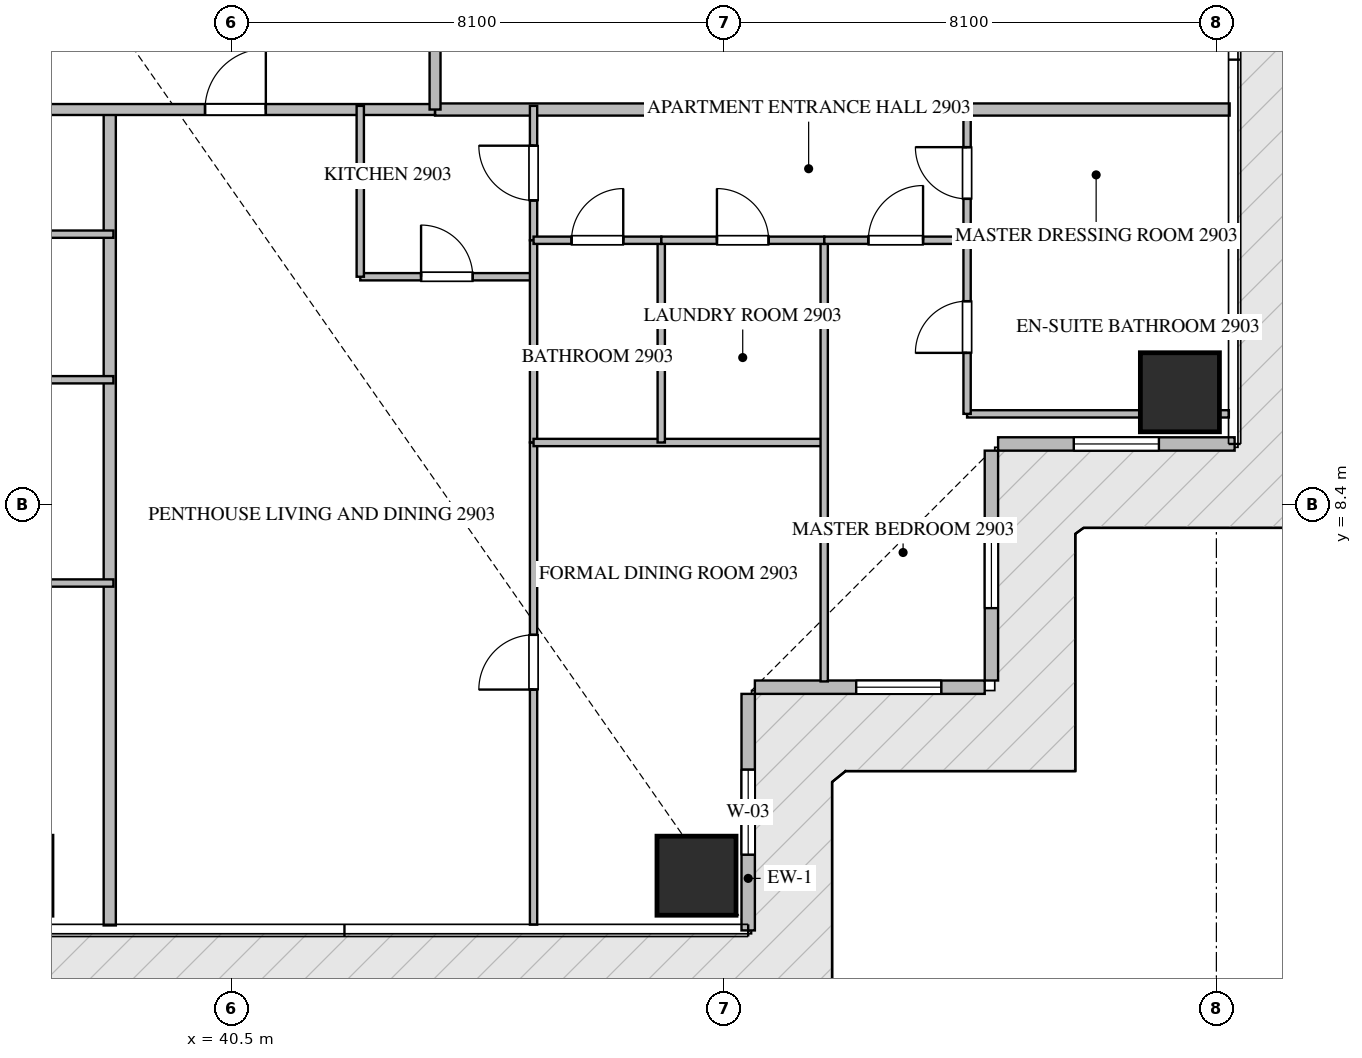
"""IFC4 building model, lengths in metres.
Left out: names, types, materials, properties, quantities, classifications, styles, units other than length and angle.
Written with IfcOpenShell. Run it as: python <this file> out.ifc"""

import sys

from ifc_helpers import new_model, si_unit, direction, frame, frame_2d, origin, origin_2d, place, context, subcontext, project, spatial, rectangle, extrude, source, transform, mapped, element, fill, save


model = new_model("IFC4")
c1 = context("Model", 3, precision=1e-05, world=origin(), true_north=direction((0.0, 1.0)))
c2 = subcontext(c1, "Body", "Model", "MODEL_VIEW")
j1 = project(units=[si_unit("LENGTHUNIT", "METRE"), si_unit("PLANEANGLEUNIT", "RADIAN")], contexts=[c1])
p1 = place(None, origin())
s1 = spatial("IfcSite", under=j1, at=p1, CompositionType="ELEMENT")
p2 = place(p1, origin())
s2 = spatial("IfcBuilding", under=s1, at=p2, CompositionType="ELEMENT")
p3 = place(p2, frame((0.0, 0.0, 120.15)))
s3 = spatial("IfcBuildingStorey", under=s2, at=p3, CompositionType="ELEMENT", Elevation=120.15)
m1 = source(origin(), c2, "Body", "SweptSolid", [
    extrude(rectangle(XDim=1.3, YDim=1.3, at=origin_2d()), origin(), (0.0, 0.0, 1.0), 3.93),
])
for number, where, z_axis, x_axis in (
    (1, (48.15, 2.3, -0.44), (0.0, 0.0, 1.0), (1.0, 0.0, 0.0)),
    (2, (56.1, 10.25, -0.44), (0.0, 0.0, 1.0), (1.0, 0.0, 0.0)),
):
    element("IfcColumn", number, at=place(p3, frame(where, z_axis=z_axis, x_axis=x_axis)), inside=s3, PredefinedType="COLUMN", context=c2, shape_type="MappedRepresentation", body=[
        mapped(m1, transform((0.0, 0.0, 0.0), scale=1.0)),
    ])
p4 = place(p3, frame((49.0, 1.4, 0.0), z_axis=(0.0, 0.0, 1.0), x_axis=(0.0, 1.0, 0.0)))
e3 = element("IfcWall", 3, at=p4, inside=s3, PredefinedType="ELEMENTEDWALL", context=c2, shape_type="SweptSolid", body=[
    extrude(rectangle(XDim=3.89, YDim=0.22, at=frame_2d((1.945, 0.0))), origin(), (0.0, 0.0, 1.0), 3.475),
])
p5 = place(p4, frame((1.245, 0.0, 0.65)))
e4 = element("IfcOpeningElement", 4, at=p5, cuts=e3, PredefinedType="OPENING", context=c2, shape_type="SweptSolid", body=[
    extrude(rectangle(XDim=1.4, YDim=2.05, at=frame_2d((0.7, 1.025))), frame((0.0, 0.12, 0.0), z_axis=(0.0, -1.0, 0.0), x_axis=(1.0, 0.0, 0.0)), (0.0, 0.0, 1.0), 0.24),
])
p6 = place(p3, frame((49.11, 5.4, 0.0), z_axis=(0.0, 0.0, 1.0), x_axis=(1.0, 0.0, 0.0)))
e5 = element("IfcWall", 5, at=p6, inside=s3, PredefinedType="ELEMENTEDWALL", context=c2, shape_type="SweptSolid", body=[
    extrude(rectangle(XDim=3.78, YDim=0.22, at=frame_2d((1.89, 0.0))), origin(), (0.0, 0.0, 1.0), 3.475),
])
p7 = place(p6, frame((1.666, 0.0, 0.65)))
e6 = element("IfcOpeningElement", 6, at=p7, cuts=e5, PredefinedType="OPENING", context=c2, shape_type="SweptSolid", body=[
    extrude(rectangle(XDim=1.4, YDim=2.05, at=frame_2d((0.7, 1.025))), frame((0.0, 0.12, 0.0), z_axis=(0.0, -1.0, 0.0), x_axis=(1.0, 0.0, 0.0)), (0.0, 0.0, 1.0), 0.24),
])
p8 = place(p3, frame((53.0, 5.51, 0.0), z_axis=(0.0, 0.0, 1.0), x_axis=(0.0, 1.0, 0.0)))
e7 = element("IfcWall", 7, at=p8, inside=s3, PredefinedType="ELEMENTEDWALL", context=c2, shape_type="SweptSolid", body=[
    extrude(rectangle(XDim=3.78, YDim=0.22, at=frame_2d((1.89, 0.0))), origin(), (0.0, 0.0, 1.0), 3.475),
])
p9 = place(p8, frame((1.19, 0.0, 0.65)))
e8 = element("IfcOpeningElement", 8, at=p9, cuts=e7, PredefinedType="OPENING", context=c2, shape_type="SweptSolid", body=[
    extrude(rectangle(XDim=1.4, YDim=2.05, at=frame_2d((0.7, 1.025))), frame((0.0, 0.12, 0.0), z_axis=(0.0, -1.0, 0.0), x_axis=(1.0, 0.0, 0.0)), (0.0, 0.0, 1.0), 0.24),
])
p10 = place(p3, frame((53.11, 9.4, 0.0), z_axis=(0.0, 0.0, 1.0), x_axis=(1.0, 0.0, 0.0)))
e9 = element("IfcWall", 9, at=p10, inside=s3, PredefinedType="ELEMENTEDWALL", context=c2, shape_type="SweptSolid", body=[
    extrude(rectangle(XDim=3.89, YDim=0.22, at=frame_2d((1.945, 0.0))), origin(), (0.0, 0.0, 1.0), 3.475),
])
p11 = place(p10, frame((1.245, 0.0, 0.65)))
e10 = element("IfcOpeningElement", 10, at=p11, cuts=e9, PredefinedType="OPENING", context=c2, shape_type="SweptSolid", body=[
    extrude(rectangle(XDim=1.4, YDim=2.05, at=frame_2d((0.7, 1.025))), frame((0.0, 0.12, 0.0), z_axis=(0.0, -1.0, 0.0), x_axis=(1.0, 0.0, 0.0)), (0.0, 0.0, 1.0), 0.24),
])
p12 = place(p3, frame((38.5, 1.482, 0.0), z_axis=(0.0, 0.0, 1.0), x_axis=(0.0, 1.0, 0.0)))
e11 = element("IfcWall", 11, at=p12, inside=s3, PredefinedType="PARTITIONING", context=c2, shape_type="SweptSolid", body=[
    extrude(rectangle(XDim=13.418, YDim=0.2, at=frame_2d((6.709, 0.0))), origin(), (0.0, 0.0, 1.0), 3.49),
])
p13 = place(p3, frame((43.85, 14.9, 0.0), z_axis=(0.0, 0.0, 1.0), x_axis=(1.0, 0.0, 0.0)))
e12 = element("IfcWall", 12, at=p13, inside=s3, PredefinedType="PARTITIONING", context=c2, shape_type="SweptSolid", body=[
    extrude(rectangle(XDim=13.068, YDim=0.2, at=frame_2d((6.534, 0.0))), origin(), (0.0, 0.0, 1.0), 3.49),
])
p14 = place(p3, frame((20.952, 14.9, 0.0), z_axis=(0.0, 0.0, 1.0), x_axis=(1.0, 0.0, 0.0)))
e13 = element("IfcWall", 13, at=p14, inside=s3, PredefinedType="PARTITIONING", context=c2, shape_type="SweptSolid", body=[
    extrude(rectangle(XDim=22.896, YDim=0.18, at=frame_2d((11.448, 0.0))), origin(), (0.0, 0.0, 1.0), 3.49),
])
p15 = place(p14, frame((2.781, 0.0, 0.0)))
e14 = element("IfcOpeningElement", 14, at=p15, cuts=e13, PredefinedType="OPENING", context=c2, shape_type="SweptSolid", body=[
    extrude(rectangle(XDim=1.0, YDim=2.15, at=frame_2d((0.5, 1.075))), frame((0.0, 0.1, 0.0), z_axis=(0.0, -1.0, 0.0), x_axis=(1.0, 0.0, 0.0)), (0.0, 0.0, 1.0), 0.2),
])
p16 = place(p14, frame((7.16, 0.0, 0.0)))
e15 = element("IfcOpeningElement", 15, at=p16, cuts=e13, PredefinedType="OPENING", context=c2, shape_type="SweptSolid", body=[
    extrude(rectangle(XDim=1.0, YDim=2.15, at=frame_2d((0.5, 1.075))), frame((0.0, 0.1, 0.0), z_axis=(0.0, -1.0, 0.0), x_axis=(1.0, 0.0, 0.0)), (0.0, 0.0, 1.0), 0.2),
])
p17 = place(p14, frame((19.115, 0.0, 0.0)))
e16 = element("IfcOpeningElement", 16, at=p17, cuts=e13, PredefinedType="OPENING", context=c2, shape_type="SweptSolid", body=[
    extrude(rectangle(XDim=1.0, YDim=2.15, at=frame_2d((0.5, 1.075))), frame((0.0, 0.1, 0.0), z_axis=(0.0, -1.0, 0.0), x_axis=(1.0, 0.0, 0.0)), (0.0, 0.0, 1.0), 0.2),
])
p18 = place(p3, frame((43.85, 14.9, 0.0), z_axis=(0.0, 0.0, 1.0), x_axis=(0.0, 1.0, 0.0)))
e17 = element("IfcWall", 17, at=p18, inside=s3, PredefinedType="PARTITIONING", context=c2, shape_type="SweptSolid", body=[
    extrude(rectangle(XDim=18.7, YDim=0.18, at=frame_2d((9.35, 0.0))), origin(), (0.0, 0.0, 1.0), 3.49),
])
p19 = place(p18, frame((1.805, 0.0, 0.0)))
e18 = element("IfcOpeningElement", 18, at=p19, cuts=e17, PredefinedType="OPENING", context=c2, shape_type="SweptSolid", body=[
    extrude(rectangle(XDim=1.0, YDim=2.15, at=frame_2d((0.5, 1.075))), frame((0.0, 0.1, 0.0), z_axis=(0.0, -1.0, 0.0), x_axis=(1.0, 0.0, 0.0)), (0.0, 0.0, 1.0), 0.2),
])
p20 = place(p18, frame((10.602, 0.0, 0.0)))
e19 = element("IfcOpeningElement", 19, at=p20, cuts=e17, PredefinedType="OPENING", context=c2, shape_type="SweptSolid", body=[
    extrude(rectangle(XDim=1.0, YDim=2.15, at=frame_2d((0.5, 1.075))), frame((0.0, 0.1, 0.0), z_axis=(0.0, -1.0, 0.0), x_axis=(1.0, 0.0, 0.0)), (0.0, 0.0, 1.0), 0.2),
])
p21 = place(p3, frame((30.94, 7.113, 0.0), z_axis=(0.0, 0.0, 1.0), x_axis=(1.0, 0.0, 0.0)))
e20 = element("IfcWall", 20, at=p21, inside=s3, PredefinedType="PARTITIONING", context=c2, shape_type="SweptSolid", body=[
    extrude(rectangle(XDim=7.62, YDim=0.12, at=frame_2d((3.81, 0.0))), origin(), (0.0, 0.0, 1.0), 3.49),
])
p22 = place(p3, frame((30.94, 10.456, 0.0), z_axis=(0.0, 0.0, 1.0), x_axis=(1.0, 0.0, 0.0)))
e21 = element("IfcWall", 21, at=p22, inside=s3, PredefinedType="PARTITIONING", context=c2, shape_type="SweptSolid", body=[
    extrude(rectangle(XDim=7.62, YDim=0.12, at=frame_2d((3.81, 0.0))), origin(), (0.0, 0.0, 1.0), 2.972),
])
p23 = place(p3, frame((30.94, 12.85, 0.0), z_axis=(0.0, 0.0, 1.0), x_axis=(1.0, 0.0, 0.0)))
e22 = element("IfcWall", 22, at=p23, inside=s3, PredefinedType="PARTITIONING", context=c2, shape_type="SweptSolid", body=[
    extrude(rectangle(XDim=7.62, YDim=0.12, at=frame_2d((3.81, 0.0))), origin(), (0.0, 0.0, 1.0), 3.49),
])
p24 = place(p3, frame((42.62, 12.15, 0.0), z_axis=(0.0, 0.0, 1.0), x_axis=(1.0, 0.0, 0.0)))
e23 = element("IfcWall", 23, at=p24, inside=s3, PredefinedType="PARTITIONING", context=c2, shape_type="SweptSolid", body=[
    extrude(rectangle(XDim=2.85, YDim=0.12, at=frame_2d((1.425, 0.0))), origin(), (0.0, 0.0, 1.0), 3.49),
])
p25 = place(p24, frame((1.0, 0.0, 0.0)))
e24 = element("IfcOpeningElement", 24, at=p25, cuts=e23, PredefinedType="OPENING", context=c2, shape_type="SweptSolid", body=[
    extrude(rectangle(XDim=0.85, YDim=2.1, at=frame_2d((0.425, 1.05))), frame((0.0, 0.07, 0.0), z_axis=(0.0, -1.0, 0.0), x_axis=(1.0, 0.0, 0.0)), (0.0, 0.0, 1.0), 0.14),
])
p26 = place(p3, frame((42.62, 12.15, 0.0), z_axis=(0.0, 0.0, 1.0), x_axis=(0.0, 1.0, 0.0)))
e25 = element("IfcWall", 25, at=p26, inside=s3, PredefinedType="PARTITIONING", context=c2, shape_type="SweptSolid", body=[
    extrude(rectangle(XDim=2.81, YDim=0.12, at=frame_2d((1.405, 0.0))), origin(), (0.0, 0.0, 1.0), 3.49),
])
p27 = place(p3, frame((45.47, 12.75, 0.0), z_axis=(0.0, 0.0, 1.0), x_axis=(0.0, 1.0, 0.0)))
e26 = element("IfcWall", 26, at=p27, inside=s3, PredefinedType="PARTITIONING", context=c2, shape_type="SweptSolid", body=[
    extrude(rectangle(XDim=2.21, YDim=0.12, at=frame_2d((1.105, 0.0))), origin(), (0.0, 0.0, 1.0), 3.49),
])
p28 = place(p27, frame((0.655, 0.0, 0.0)))
e27 = element("IfcOpeningElement", 27, at=p28, cuts=e26, PredefinedType="OPENING", context=c2, shape_type="SweptSolid", body=[
    extrude(rectangle(XDim=0.9, YDim=2.1, at=frame_2d((0.45, 1.05))), frame((0.0, 0.07, 0.0), z_axis=(0.0, -1.0, 0.0), x_axis=(1.0, 0.0, 0.0)), (0.0, 0.0, 1.0), 0.14),
])
p29 = place(p3, frame((45.47, 1.495, 0.0), z_axis=(0.0, 0.0, 1.0), x_axis=(0.0, 1.0, 0.0)))
e28 = element("IfcWall", 28, at=p29, inside=s3, PredefinedType="PARTITIONING", context=c2, shape_type="SweptSolid", body=[
    extrude(rectangle(XDim=7.929, YDim=0.12, at=frame_2d((3.964, 0.0))), origin(), (0.0, 0.0, 1.0), 3.49),
])
p30 = place(p29, frame((3.866, 0.0, 0.0)))
e29 = element("IfcOpeningElement", 29, at=p30, cuts=e28, PredefinedType="OPENING", context=c2, shape_type="SweptSolid", body=[
    extrude(rectangle(XDim=0.9, YDim=2.1, at=frame_2d((0.45, 1.05))), frame((0.0, 0.07, 0.0), z_axis=(0.0, -1.0, 0.0), x_axis=(1.0, 0.0, 0.0)), (0.0, 0.0, 1.0), 0.14),
])
p31 = place(p3, frame((45.47, 9.426, 0.0), z_axis=(0.0, 0.0, 1.0), x_axis=(0.0, 1.0, 0.0)))
e30 = element("IfcWall", 30, at=p31, inside=s3, PredefinedType="PARTITIONING", context=c2, shape_type="SweptSolid", body=[
    extrude(rectangle(XDim=3.322, YDim=0.12, at=frame_2d((1.661, 0.0))), origin(), (0.0, 0.0, 1.0), 3.49),
])
p32 = place(p3, frame((45.47, 9.424, 0.0), z_axis=(0.0, 0.0, 1.0), x_axis=(1.0, 0.0, 0.0)))
e31 = element("IfcWall", 31, at=p32, inside=s3, PredefinedType="PARTITIONING", context=c2, shape_type="SweptSolid", body=[
    extrude(rectangle(XDim=4.78, YDim=0.12, at=frame_2d((2.39, 0.0))), origin(), (0.0, 0.0, 1.0), 3.49),
])
p33 = place(p3, frame((50.25, 5.495, 0.0), z_axis=(0.0, 0.0, 1.0), x_axis=(0.0, 1.0, 0.0)))
e32 = element("IfcWall", 32, at=p33, inside=s3, PredefinedType="PARTITIONING", context=c2, shape_type="SweptSolid", body=[
    extrude(rectangle(XDim=7.255, YDim=0.12, at=frame_2d((3.627, 0.0))), origin(), (0.0, 0.0, 1.0), 3.49),
])
p34 = place(p3, frame((47.57, 9.424, 0.0), z_axis=(0.0, 0.0, 1.0), x_axis=(0.0, 1.0, 0.0)))
e33 = element("IfcWall", 33, at=p34, inside=s3, PredefinedType="PARTITIONING", context=c2, shape_type="SweptSolid", body=[
    extrude(rectangle(XDim=3.326, YDim=0.12, at=frame_2d((1.663, 0.0))), origin(), (0.0, 0.0, 1.0), 3.49),
])
p35 = place(p3, frame((45.47, 12.75, 0.0), z_axis=(0.0, 0.0, 1.0), x_axis=(1.0, 0.0, 0.0)))
e34 = element("IfcWall", 34, at=p35, inside=s3, PredefinedType="PARTITIONING", context=c2, shape_type="SweptSolid", body=[
    extrude(rectangle(XDim=2.1, YDim=0.12, at=frame_2d((1.05, 0.0))), origin(), (0.0, 0.0, 1.0), 3.49),
])
p36 = place(p35, frame((0.625, 0.0, 0.0)))
e35 = element("IfcOpeningElement", 35, at=p36, cuts=e34, PredefinedType="OPENING", context=c2, shape_type="SweptSolid", body=[
    extrude(rectangle(XDim=0.85, YDim=2.1, at=frame_2d((0.425, 1.05))), frame((0.0, 0.07, 0.0), z_axis=(0.0, -1.0, 0.0), x_axis=(1.0, 0.0, 0.0)), (0.0, 0.0, 1.0), 0.14),
])
p37 = place(p3, frame((47.572, 12.75, 0.0), z_axis=(0.0, 0.0, 1.0), x_axis=(1.0, 0.0, 0.0)))
e36 = element("IfcWall", 36, at=p37, inside=s3, PredefinedType="PARTITIONING", context=c2, shape_type="SweptSolid", body=[
    extrude(rectangle(XDim=2.678, YDim=0.12, at=frame_2d((1.339, 0.0))), origin(), (0.0, 0.0, 1.0), 3.49),
])
p38 = place(p37, frame((0.914, 0.0, 0.0)))
e37 = element("IfcOpeningElement", 37, at=p38, cuts=e36, PredefinedType="OPENING", context=c2, shape_type="SweptSolid", body=[
    extrude(rectangle(XDim=0.85, YDim=2.1, at=frame_2d((0.425, 1.05))), frame((0.0, 0.07, 0.0), z_axis=(0.0, -1.0, 0.0), x_axis=(1.0, 0.0, 0.0)), (0.0, 0.0, 1.0), 0.14),
])
p39 = place(p3, frame((50.252, 12.75, 0.0), z_axis=(0.0, 0.0, 1.0), x_axis=(1.0, 0.0, 0.0)))
e38 = element("IfcWall", 38, at=p39, inside=s3, PredefinedType="PARTITIONING", context=c2, shape_type="SweptSolid", body=[
    extrude(rectangle(XDim=2.348, YDim=0.12, at=frame_2d((1.174, 0.0))), origin(), (0.0, 0.0, 1.0), 3.49),
])
p40 = place(p39, frame((0.724, 0.0, 0.0)))
e39 = element("IfcOpeningElement", 39, at=p40, cuts=e38, PredefinedType="OPENING", context=c2, shape_type="SweptSolid", body=[
    extrude(rectangle(XDim=0.9, YDim=2.1, at=frame_2d((0.45, 1.05))), frame((0.0, 0.07, 0.0), z_axis=(0.0, -1.0, 0.0), x_axis=(1.0, 0.0, 0.0)), (0.0, 0.0, 1.0), 0.14),
])
p41 = place(p3, frame((52.6, 9.895, 0.0), z_axis=(0.0, 0.0, 1.0), x_axis=(1.0, 0.0, 0.0)))
e40 = element("IfcWall", 40, at=p41, inside=s3, PredefinedType="PARTITIONING", context=c2, shape_type="SweptSolid", body=[
    extrude(rectangle(XDim=4.305, YDim=0.12, at=frame_2d((2.152, 0.0))), origin(), (0.0, 0.0, 1.0), 3.49),
])
p42 = place(p3, frame((52.602, 12.75, 0.0), z_axis=(0.0, 0.0, 1.0), x_axis=(1.0, 0.0, 0.0)))
e41 = element("IfcWall", 41, at=p42, inside=s3, PredefinedType="PARTITIONING", context=c2, shape_type="SweptSolid", body=[
    extrude(rectangle(XDim=4.303, YDim=0.12, at=frame_2d((2.151, 0.0))), origin(), (0.0, 0.0, 1.0), 3.49),
])
p43 = place(p3, frame((52.6, 9.895, 0.0), z_axis=(0.0, 0.0, 1.0), x_axis=(0.0, 1.0, 0.0)))
e42 = element("IfcWall", 42, at=p43, inside=s3, PredefinedType="PARTITIONING", context=c2, shape_type="SweptSolid", body=[
    extrude(rectangle(XDim=2.855, YDim=0.12, at=frame_2d((1.427, 0.0))), origin(), (0.0, 0.0, 1.0), 3.49),
])
p44 = place(p43, frame((1.003, 0.0, 0.0)))
e43 = element("IfcOpeningElement", 43, at=p44, cuts=e42, PredefinedType="OPENING", context=c2, shape_type="SweptSolid", body=[
    extrude(rectangle(XDim=0.85, YDim=2.1, at=frame_2d((0.425, 1.05))), frame((0.0, 0.07, 0.0), z_axis=(0.0, -1.0, 0.0), x_axis=(1.0, 0.0, 0.0)), (0.0, 0.0, 1.0), 0.14),
])
p45 = place(p3, frame((52.6, 12.752, 0.0), z_axis=(0.0, 0.0, 1.0), x_axis=(0.0, 1.0, 0.0)))
e44 = element("IfcWall", 44, at=p45, inside=s3, PredefinedType="PARTITIONING", context=c2, shape_type="SweptSolid", body=[
    extrude(rectangle(XDim=2.208, YDim=0.12, at=frame_2d((1.104, 0.0))), origin(), (0.0, 0.0, 1.0), 3.49),
])
p46 = place(p45, frame((0.679, 0.0, 0.0)))
e45 = element("IfcOpeningElement", 45, at=p46, cuts=e44, PredefinedType="OPENING", context=c2, shape_type="SweptSolid", body=[
    extrude(rectangle(XDim=0.85, YDim=2.1, at=frame_2d((0.425, 1.05))), frame((0.0, 0.07, 0.0), z_axis=(0.0, -1.0, 0.0), x_axis=(1.0, 0.0, 0.0)), (0.0, 0.0, 1.0), 0.14),
])
m2 = source(origin(), c2, "Body", "SweptSolid", [
    extrude(rectangle(XDim=1.4, YDim=2.05, at=frame_2d((0.7, 1.025))), frame((0.0, 0.03, 0.0), z_axis=(0.0, -1.0, 0.0), x_axis=(1.0, 0.0, 0.0)), (0.0, 0.0, 1.0), 0.06),
])
p47 = place(p5, origin())
e46 = element("IfcWindow", 46, at=p47, inside=s3, PartitioningType="SINGLE_PANEL", PredefinedType="WINDOW", context=c2, shape_type="MappedRepresentation", body=[
    mapped(m2, transform((0.0, 0.0, 0.0), scale=1.0)),
])
fill(e4, e46)
p48 = place(p7, origin())
e47 = element("IfcWindow", 47, at=p48, inside=s3, PartitioningType="SINGLE_PANEL", PredefinedType="WINDOW", context=c2, shape_type="MappedRepresentation", body=[
    mapped(m2, transform((0.0, 0.0, 0.0), scale=1.0)),
])
fill(e6, e47)
p49 = place(p9, origin())
e48 = element("IfcWindow", 48, at=p49, inside=s3, PartitioningType="SINGLE_PANEL", PredefinedType="WINDOW", context=c2, shape_type="MappedRepresentation", body=[
    mapped(m2, transform((0.0, 0.0, 0.0), scale=1.0)),
])
fill(e8, e48)
p50 = place(p11, origin())
e49 = element("IfcWindow", 49, at=p50, inside=s3, PartitioningType="SINGLE_PANEL", PredefinedType="WINDOW", context=c2, shape_type="MappedRepresentation", body=[
    mapped(m2, transform((0.0, 0.0, 0.0), scale=1.0)),
])
fill(e10, e49)
m3 = source(origin(), c2, "Body", "SweptSolid", [
    extrude(rectangle(XDim=1.0, YDim=2.15, at=frame_2d((0.5, 1.075))), frame((0.0, 0.025, 0.0), z_axis=(0.0, -1.0, 0.0), x_axis=(1.0, 0.0, 0.0)), (0.0, 0.0, 1.0), 0.05),
])
p51 = place(p17, origin())
e50 = element("IfcDoor", 50, at=p51, inside=s3, OperationType="SINGLE_SWING_RIGHT", PredefinedType="DOOR", context=c2, shape_type="MappedRepresentation", body=[
    mapped(m3, transform((0.0, 0.0, 0.0), scale=1.0)),
])
fill(e16, e50)
m4 = source(origin(), c2, "Body", "SweptSolid", [
    extrude(rectangle(XDim=0.85, YDim=2.1, at=frame_2d((0.425, 1.05))), frame((0.0, 0.025, 0.0), z_axis=(0.0, -1.0, 0.0), x_axis=(1.0, 0.0, 0.0)), (0.0, 0.0, 1.0), 0.05),
])
p52 = place(p25, origin())
e51 = element("IfcDoor", 51, at=p52, inside=s3, OperationType="SINGLE_SWING_LEFT", PredefinedType="DOOR", context=c2, shape_type="MappedRepresentation", body=[
    mapped(m4, transform((0.0, 0.0, 0.0), scale=1.0)),
])
fill(e24, e51)
m5 = source(origin(), c2, "Body", "SweptSolid", [
    extrude(rectangle(XDim=0.9, YDim=2.1, at=frame_2d((0.45, 1.05))), frame((0.0, 0.025, 0.0), z_axis=(0.0, -1.0, 0.0), x_axis=(1.0, 0.0, 0.0)), (0.0, 0.0, 1.0), 0.05),
])
p53 = place(p28, origin())
e52 = element("IfcDoor", 52, at=p53, inside=s3, OperationType="SINGLE_SWING_RIGHT", PredefinedType="DOOR", context=c2, shape_type="MappedRepresentation", body=[
    mapped(m5, transform((0.0, 0.0, 0.0), scale=1.0)),
])
fill(e27, e52)
p54 = place(p30, origin())
e53 = element("IfcDoor", 53, at=p54, inside=s3, OperationType="SINGLE_SWING_LEFT", PredefinedType="DOOR", context=c2, shape_type="MappedRepresentation", body=[
    mapped(m5, transform((0.0, 0.0, 0.0), scale=1.0)),
])
fill(e29, e53)
p55 = place(p36, origin())
e54 = element("IfcDoor", 54, at=p55, inside=s3, OperationType="SINGLE_SWING_RIGHT", PredefinedType="DOOR", context=c2, shape_type="MappedRepresentation", body=[
    mapped(m4, transform((0.0, 0.0, 0.0), scale=1.0)),
])
fill(e35, e54)
p56 = place(p38, origin())
e55 = element("IfcDoor", 55, at=p56, inside=s3, OperationType="SINGLE_SWING_LEFT", PredefinedType="DOOR", context=c2, shape_type="MappedRepresentation", body=[
    mapped(m4, transform((0.0, 0.0, 0.0), scale=1.0)),
])
fill(e37, e55)
p57 = place(p40, origin())
e56 = element("IfcDoor", 56, at=p57, inside=s3, OperationType="SINGLE_SWING_RIGHT", PredefinedType="DOOR", context=c2, shape_type="MappedRepresentation", body=[
    mapped(m5, transform((0.0, 0.0, 0.0), scale=1.0)),
])
fill(e39, e56)
p58 = place(p44, origin())
e57 = element("IfcDoor", 57, at=p58, inside=s3, OperationType="SINGLE_SWING_LEFT", PredefinedType="DOOR", context=c2, shape_type="MappedRepresentation", body=[
    mapped(m4, transform((0.0, 0.0, 0.0), scale=1.0)),
])
fill(e43, e57)
p59 = place(p46, origin())
e58 = element("IfcDoor", 58, at=p59, inside=s3, OperationType="SINGLE_SWING_RIGHT", PredefinedType="DOOR", context=c2, shape_type="MappedRepresentation", body=[
    mapped(m4, transform((0.0, 0.0, 0.0), scale=1.0)),
])
fill(e45, e58)
save(model, sys.argv[1])
